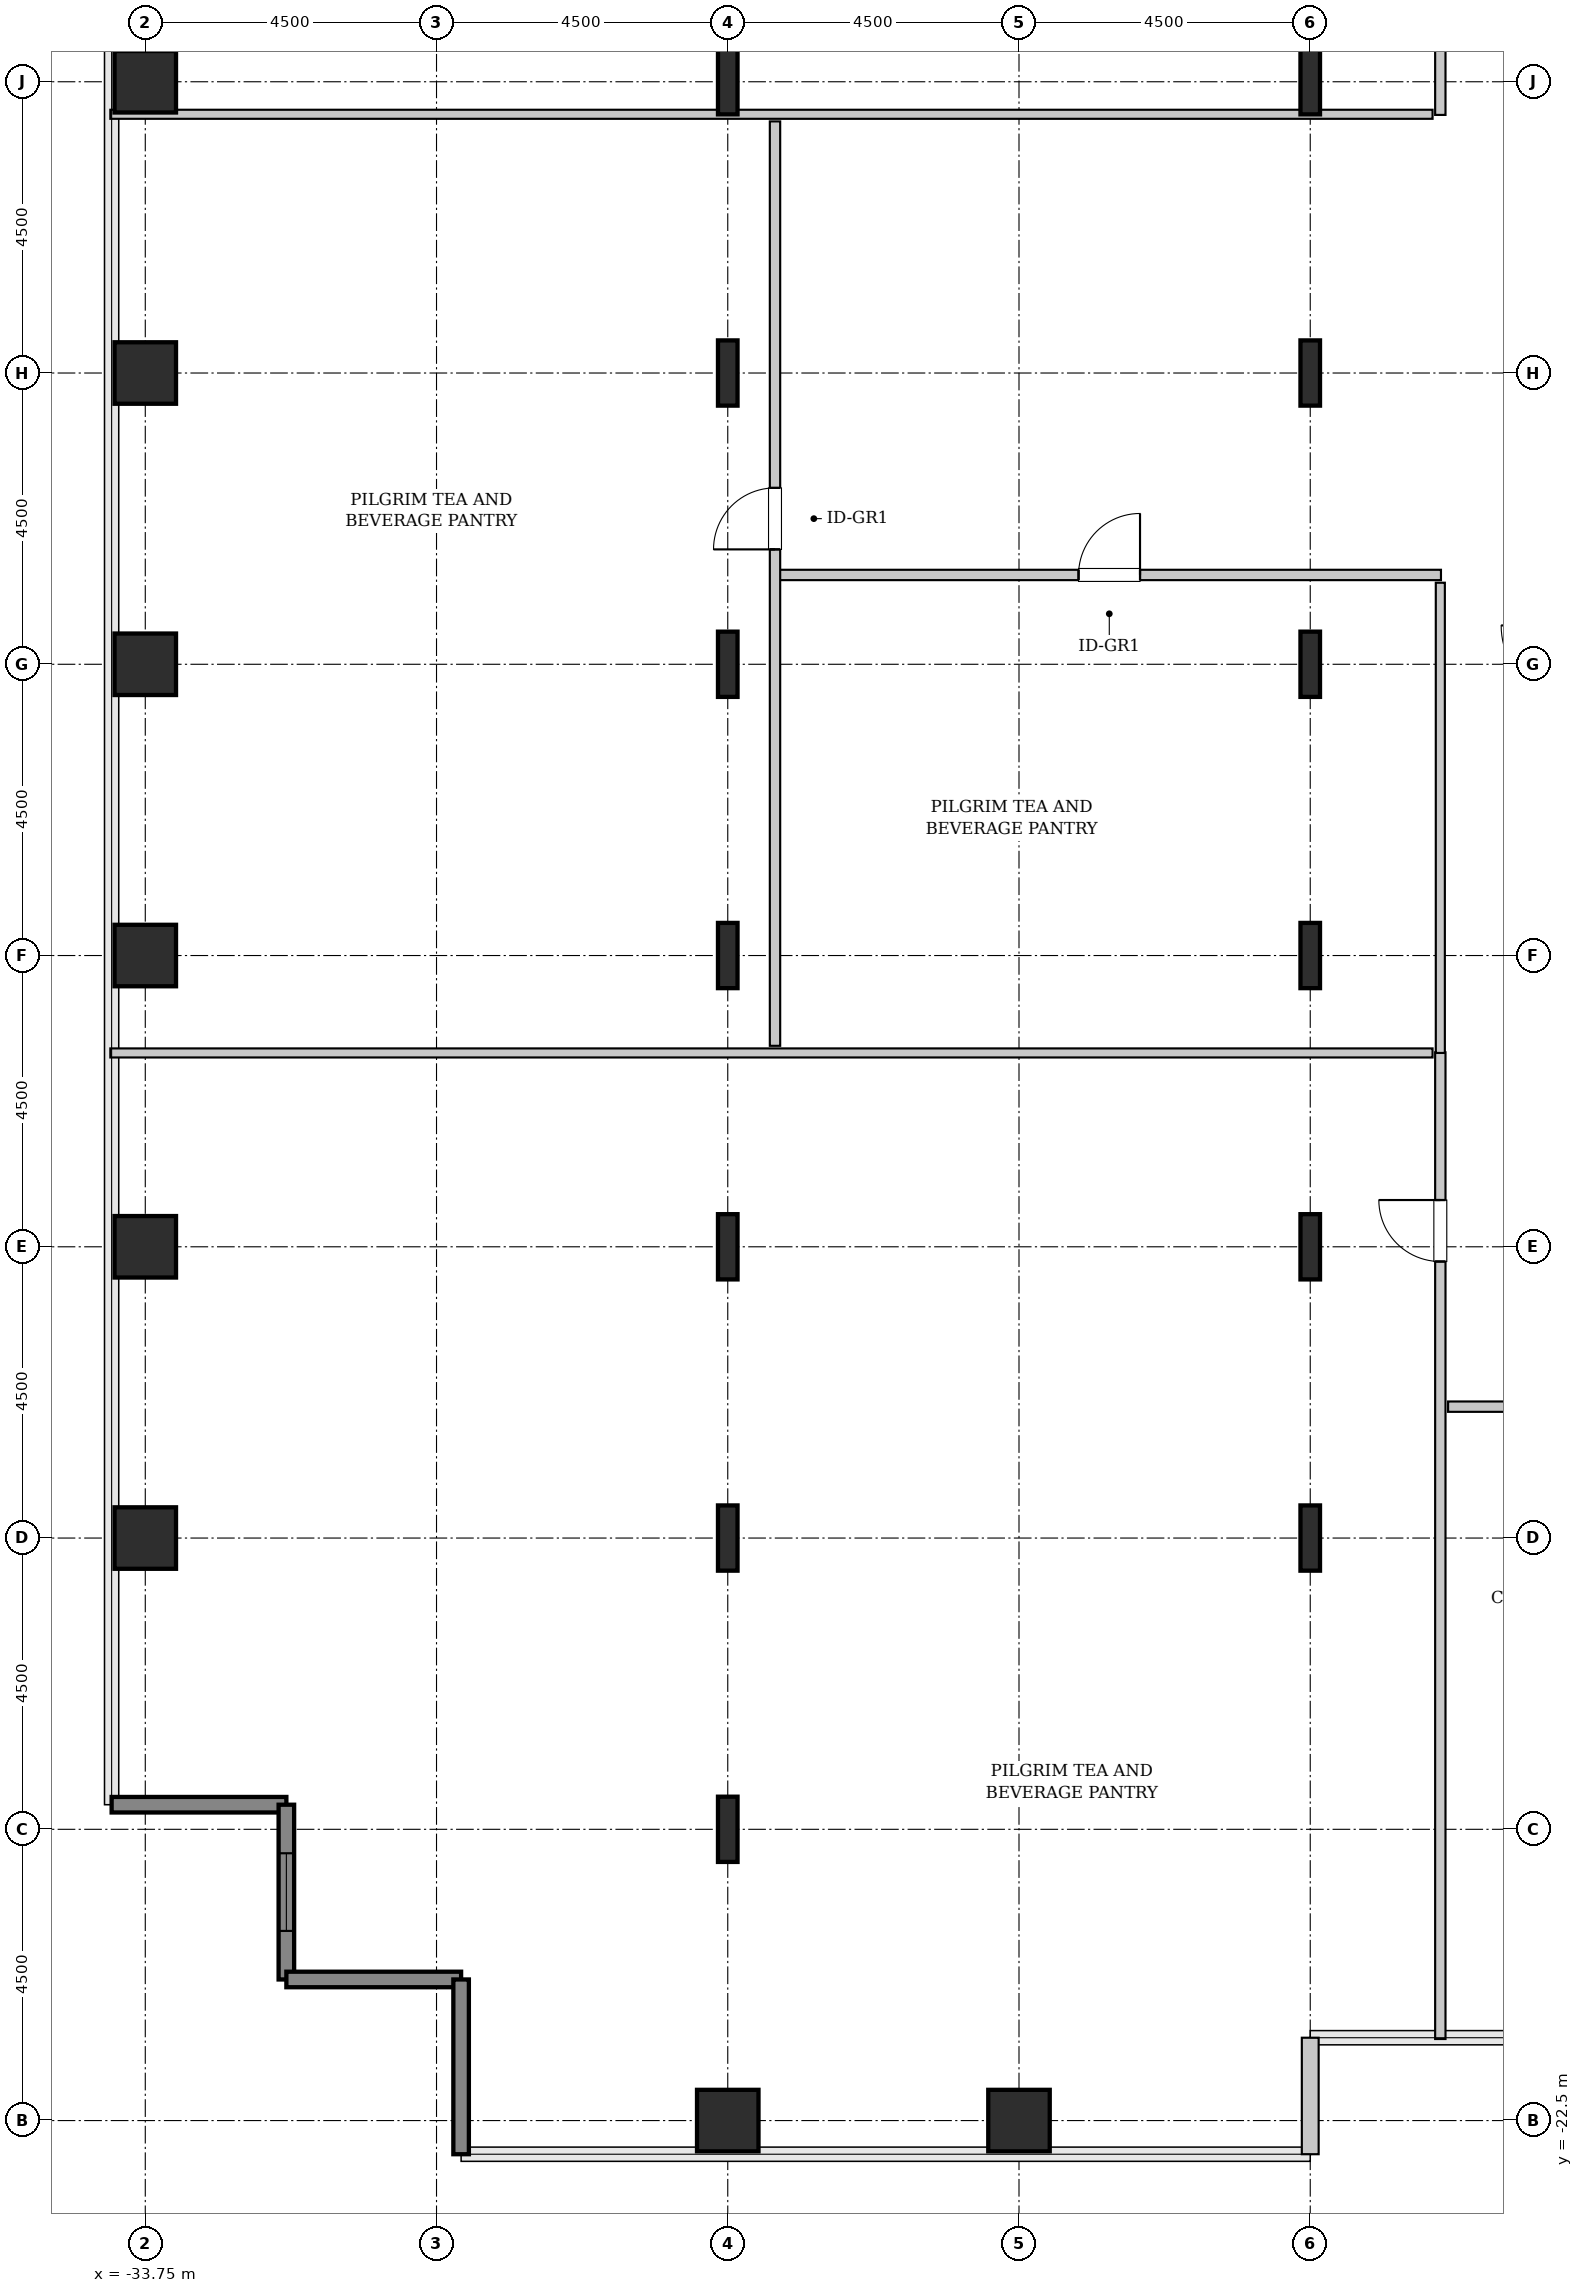
"""IFC4 building model, lengths in metres.
Left out: names, types, materials, properties, quantities, classifications, styles, units other than length and angle.
Written with IfcOpenShell. Run it as: python <this file> out.ifc"""

import sys

from ifc_helpers import new_model, si_unit, direction, frame, frame_2d, origin, origin_2d, place, context, subcontext, project, spatial, rectangle, hollow_rectangle, i_section, extrude, source, transform, mapped, element, fill, save


model = new_model("IFC4")
c1 = context("Model", 3, precision=1e-05, world=origin(), true_north=direction((0.0, 1.0)))
c2 = subcontext(c1, "Body", "Model", "MODEL_VIEW")
j1 = project(units=[si_unit("LENGTHUNIT", "METRE"), si_unit("PLANEANGLEUNIT", "RADIAN")], contexts=[c1])
p1 = place(None, origin())
s1 = spatial("IfcSite", under=j1, at=p1, CompositionType="ELEMENT")
p2 = place(p1, origin())
s2 = spatial("IfcBuilding", under=s1, at=p2, CompositionType="ELEMENT")
p3 = place(p2, frame((0.0, 0.0, 63.4)))
s3 = spatial("IfcBuildingStorey", under=s2, at=p3, CompositionType="ELEMENT", Elevation=63.4)
m1 = source(origin(), c2, "Body", "SweptSolid", [
    extrude(hollow_rectangle(XDim=0.95, YDim=0.95, WallThickness=0.045, InnerFilletRadius=0.045, OuterFilletRadius=0.09, at=origin_2d()), origin(), (0.0, 0.0, 1.0), 3.8),
])
for number, where, z_axis, x_axis in (
    (1, (-33.75, -13.5, 0.0), (0.0, 0.0, 1.0), (1.0, 0.0, 0.0)),
    (2, (-33.75, -9.0, 0.0), (0.0, 0.0, 1.0), (1.0, 0.0, 0.0)),
    (3, (-33.75, -4.5, 0.0), (0.0, 0.0, 1.0), (1.0, 0.0, 0.0)),
    (4, (-33.75, 0.0, 0.0), (0.0, 0.0, 1.0), (1.0, 0.0, 0.0)),
    (5, (-33.75, 4.5, 0.0), (0.0, 0.0, 1.0), (1.0, 0.0, 0.0)),
    (6, (-33.75, 9.0, 0.0), (0.0, 0.0, 1.0), (1.0, 0.0, 0.0)),
    (7, (-24.75, -22.5, 0.0), (0.0, 0.0, 1.0), (1.0, 0.0, 0.0)),
):
    element("IfcColumn", number, at=place(p3, frame(where, z_axis=z_axis, x_axis=x_axis)), inside=s3, PredefinedType="COLUMN", context=c2, shape_type="MappedRepresentation", body=[
        mapped(m1, transform((0.0, 0.0, 0.0), x_axis=(1.0, 0.0, 0.0), y_axis=(0.0, 1.0, 0.0), z_axis=(0.0, 0.0, 1.0), scale=1.0)),
    ])
m2 = source(origin(), c2, "Body", "SweptSolid", [
    extrude(i_section(OverallWidth=0.302, OverallDepth=1.008, WebThickness=0.021, FlangeThickness=0.04, FilletRadius=0.03, at=origin_2d()), origin(), (0.0, 0.0, 1.0), 3.8),
])
for number, where, z_axis, x_axis in (
    (8, (-24.75, -18.0, 0.0), (0.0, 0.0, 1.0), (1.0, 0.0, 0.0)),
    (9, (-24.75, -13.5, 0.0), (0.0, 0.0, 1.0), (1.0, 0.0, 0.0)),
    (10, (-24.75, -9.0, 0.0), (0.0, 0.0, 1.0), (1.0, 0.0, 0.0)),
    (11, (-24.75, -4.5, 0.0), (0.0, 0.0, 1.0), (1.0, 0.0, 0.0)),
    (12, (-24.75, 0.0, 0.0), (0.0, 0.0, 1.0), (1.0, 0.0, 0.0)),
    (13, (-24.75, 4.5, 0.0), (0.0, 0.0, 1.0), (1.0, 0.0, 0.0)),
    (14, (-24.75, 9.0, 0.0), (0.0, 0.0, 1.0), (1.0, 0.0, 0.0)),
):
    element("IfcColumn", number, at=place(p3, frame(where, z_axis=z_axis, x_axis=x_axis)), inside=s3, PredefinedType="COLUMN", context=c2, shape_type="MappedRepresentation", body=[
        mapped(m2, transform((0.0, 0.0, 0.0), x_axis=(1.0, 0.0, 0.0), y_axis=(0.0, 1.0, 0.0), z_axis=(0.0, 0.0, 1.0), scale=1.0)),
    ])
p4 = place(p3, frame((-20.25, -22.5, 0.0), z_axis=(0.0, 0.0, 1.0), x_axis=(1.0, 0.0, 0.0)))
e15 = element("IfcColumn", 15, at=p4, inside=s3, PredefinedType="COLUMN", context=c2, shape_type="MappedRepresentation", body=[
    mapped(m1, transform((0.0, 0.0, 0.0), x_axis=(1.0, 0.0, 0.0), y_axis=(0.0, 1.0, 0.0), z_axis=(0.0, 0.0, 1.0), scale=1.0)),
])
for number, where, z_axis, x_axis in (
    (16, (-15.75, -13.5, 0.0), (0.0, 0.0, 1.0), (1.0, 0.0, 0.0)),
    (17, (-15.75, -9.0, 0.0), (0.0, 0.0, 1.0), (1.0, 0.0, 0.0)),
    (18, (-15.75, -4.5, 0.0), (0.0, 0.0, 1.0), (1.0, 0.0, 0.0)),
    (19, (-15.75, 0.0, 0.0), (0.0, 0.0, 1.0), (1.0, 0.0, 0.0)),
    (20, (-15.75, 4.5, 0.0), (0.0, 0.0, 1.0), (1.0, 0.0, 0.0)),
    (21, (-15.75, 9.0, 0.0), (0.0, 0.0, 1.0), (1.0, 0.0, 0.0)),
):
    element("IfcColumn", number, at=place(p3, frame(where, z_axis=z_axis, x_axis=x_axis)), inside=s3, PredefinedType="COLUMN", context=c2, shape_type="MappedRepresentation", body=[
        mapped(m2, transform((0.0, 0.0, 0.0), x_axis=(1.0, 0.0, 0.0), y_axis=(0.0, 1.0, 0.0), z_axis=(0.0, 0.0, 1.0), scale=1.0)),
    ])
m3 = source(origin(), c2, "Body", "SweptSolid", [
    extrude(rectangle(XDim=2.7, YDim=0.24, at=frame_2d((1.35, 0.0))), origin(), (0.0, 0.0, 1.0), 3.55),
])
p5 = place(p3, frame((-34.27, -17.62, 0.0), z_axis=(0.0, 0.0, 1.0), x_axis=(1.0, 0.0, 0.0)))
e22 = element("IfcWall", 22, at=p5, inside=s3, PredefinedType="SHEAR", context=c2, shape_type="MappedRepresentation", body=[
    mapped(m3, transform((0.0, 0.0, 0.0), x_axis=(1.0, 0.0, 0.0), y_axis=(0.0, 1.0, 0.0), z_axis=(0.0, 0.0, 1.0), scale=1.0)),
])
p6 = place(p3, frame((-31.57, -17.62, 0.0), z_axis=(0.0, 0.0, 1.0), x_axis=(0.0, -1.0, 0.0)))
e23 = element("IfcWall", 23, at=p6, inside=s3, PredefinedType="SHEAR", context=c2, shape_type="MappedRepresentation", body=[
    mapped(m3, transform((0.0, 0.0, 0.0), x_axis=(1.0, 0.0, 0.0), y_axis=(0.0, 1.0, 0.0), z_axis=(0.0, 0.0, 1.0), scale=1.0)),
])
p7 = place(p6, frame((0.75, 0.0, 0.85)))
e24 = element("IfcOpeningElement", 24, at=p7, cuts=e23, PredefinedType="OPENING", context=c2, shape_type="SweptSolid", body=[
    extrude(rectangle(XDim=1.2, YDim=1.8, at=frame_2d((0.6, 0.9))), frame((0.0, 0.13, 0.0), z_axis=(0.0, -1.0, 0.0), x_axis=(1.0, 0.0, 0.0)), (0.0, 0.0, 1.0), 0.26),
])
for number, where, z_axis, x_axis in (
    (25, (-31.57, -20.32, 0.0), (0.0, 0.0, 1.0), (1.0, 0.0, 0.0)),
    (26, (-28.87, -20.32, 0.0), (0.0, 0.0, 1.0), (0.0, -1.0, 0.0)),
):
    element("IfcWall", number, at=place(p3, frame(where, z_axis=z_axis, x_axis=x_axis)), inside=s3, PredefinedType="SHEAR", context=c2, shape_type="MappedRepresentation", body=[
        mapped(m3, transform((0.0, 0.0, 0.0), x_axis=(1.0, 0.0, 0.0), y_axis=(0.0, 1.0, 0.0), z_axis=(0.0, 0.0, 1.0), scale=1.0)),
    ])
m4 = source(origin(), c2, "Body", "SweptSolid", [
    extrude(rectangle(XDim=1.8, YDim=0.26, at=frame_2d((0.9, 0.0))), origin(), (0.0, 0.0, 1.0), 3.55),
])
p8 = place(p3, frame((-15.75, -23.02, 0.0), z_axis=(0.0, 0.0, 1.0), x_axis=(0.0, 1.0, 0.0)))
e27 = element("IfcWall", 27, at=p8, inside=s3, PredefinedType="SOLIDWALL", context=c2, shape_type="MappedRepresentation", body=[
    mapped(m4, transform((0.0, 0.0, 0.0), x_axis=(1.0, 0.0, 0.0), y_axis=(0.0, 1.0, 0.0), z_axis=(0.0, 0.0, 1.0), scale=1.0)),
])
m5 = source(origin(), c2, "Body", "SweptSolid", [
    extrude(rectangle(XDim=15.245, YDim=0.16, at=frame_2d((7.623, 0.0))), origin(), (0.0, 0.0, 1.0), 3.535),
])
p9 = place(p3, frame((-13.74, -21.24, 0.0), z_axis=(0.0, 0.0, 1.0), x_axis=(0.0, 1.0, 0.0)))
e28 = element("IfcWall", 28, at=p9, inside=s3, PredefinedType="PARTITIONING", context=c2, shape_type="MappedRepresentation", body=[
    mapped(m5, transform((0.0, 0.0, 0.0), x_axis=(1.0, 0.0, 0.0), y_axis=(0.0, 1.0, 0.0), z_axis=(0.0, 0.0, 1.0), scale=1.0)),
])
p10 = place(p9, frame((12.012, 0.0, 0.0)))
e29 = element("IfcOpeningElement", 29, at=p10, cuts=e28, PredefinedType="OPENING", context=c2, shape_type="SweptSolid", body=[
    extrude(rectangle(XDim=0.95, YDim=2.1, at=frame_2d((0.475, 1.05))), frame((0.0, 0.09, 0.0), z_axis=(0.0, -1.0, 0.0), x_axis=(1.0, 0.0, 0.0)), (0.0, 0.0, 1.0), 0.18),
])
m6 = source(origin(), c2, "Body", "SweptSolid", [
    extrude(rectangle(XDim=20.43, YDim=0.14, at=frame_2d((10.215, 0.0))), origin(), (0.0, 0.0, 1.0), 3.535),
])
p11 = place(p3, frame((-34.29, -6.005, 0.0), z_axis=(0.0, 0.0, 1.0), x_axis=(1.0, 0.0, 0.0)))
e30 = element("IfcWall", 30, at=p11, inside=s3, PredefinedType="PARTITIONING", context=c2, shape_type="MappedRepresentation", body=[
    mapped(m6, transform((0.0, 0.0, 0.0), x_axis=(1.0, 0.0, 0.0), y_axis=(0.0, 1.0, 0.0), z_axis=(0.0, 0.0, 1.0), scale=1.0)),
])
m7 = source(origin(), c2, "Body", "SweptSolid", [
    extrude(rectangle(XDim=12.752, YDim=0.16, at=frame_2d((6.376, 0.0))), origin(), (0.0, 0.0, 1.0), 3.535),
])
p12 = place(p3, frame((-13.74, 8.488, 0.0), z_axis=(0.0, 0.0, 1.0), x_axis=(0.0, 1.0, 0.0)))
e31 = element("IfcWall", 31, at=p12, inside=s3, PredefinedType="PARTITIONING", context=c2, shape_type="MappedRepresentation", body=[
    mapped(m7, transform((0.0, 0.0, 0.0), x_axis=(1.0, 0.0, 0.0), y_axis=(0.0, 1.0, 0.0), z_axis=(0.0, 0.0, 1.0), scale=1.0)),
])
p13 = place(p12, frame((1.036, 0.0, 0.0)))
e32 = element("IfcOpeningElement", 32, at=p13, cuts=e31, PredefinedType="OPENING", context=c2, shape_type="SweptSolid", body=[
    extrude(rectangle(XDim=0.95, YDim=2.1, at=frame_2d((0.475, 1.05))), frame((0.0, 0.09, 0.0), z_axis=(0.0, -1.0, 0.0), x_axis=(1.0, 0.0, 0.0)), (0.0, 0.0, 1.0), 0.18),
])
m8 = source(origin(), c2, "Body", "SweptSolid", [
    extrude(rectangle(XDim=20.43, YDim=0.14, at=frame_2d((10.215, 0.0))), origin(), (0.0, 0.0, 1.0), 2.825),
])
p14 = place(p3, frame((-34.29, 8.498, 0.0), z_axis=(0.0, 0.0, 1.0), x_axis=(1.0, 0.0, 0.0)))
e33 = element("IfcWall", 33, at=p14, inside=s3, PredefinedType="PARTITIONING", context=c2, shape_type="MappedRepresentation", body=[
    mapped(m8, transform((0.0, 0.0, 0.0), x_axis=(1.0, 0.0, 0.0), y_axis=(0.0, 1.0, 0.0), z_axis=(0.0, 0.0, 1.0), scale=1.0)),
])
m9 = source(origin(), c2, "Body", "SweptSolid", [
    extrude(rectangle(XDim=10.25, YDim=0.16, at=frame_2d((5.125, 0.0))), origin(), (0.0, 0.0, 1.0), 3.535),
])
p15 = place(p3, frame((-23.98, 1.38, 0.0), z_axis=(0.0, 0.0, 1.0), x_axis=(1.0, 0.0, 0.0)))
e34 = element("IfcWall", 34, at=p15, inside=s3, PredefinedType="PARTITIONING", context=c2, shape_type="MappedRepresentation", body=[
    mapped(m9, transform((0.0, 0.0, 0.0), x_axis=(1.0, 0.0, 0.0), y_axis=(0.0, 1.0, 0.0), z_axis=(0.0, 0.0, 1.0), scale=1.0)),
])
p16 = place(p15, frame((4.65, 0.0, 0.0)))
e35 = element("IfcOpeningElement", 35, at=p16, cuts=e34, PredefinedType="OPENING", context=c2, shape_type="SweptSolid", body=[
    extrude(rectangle(XDim=0.95, YDim=2.1, at=frame_2d((0.475, 1.05))), frame((0.0, 0.09, 0.0), z_axis=(0.0, -1.0, 0.0), x_axis=(1.0, 0.0, 0.0)), (0.0, 0.0, 1.0), 0.18),
])
m10 = source(origin(), c2, "Body", "SweptSolid", [
    extrude(rectangle(XDim=7.265, YDim=0.14, at=frame_2d((3.632, 0.0))), origin(), (0.0, 0.0, 1.0), 3.535),
])
p17 = place(p3, frame((-13.74, -6.005, 0.0), z_axis=(0.0, 0.0, 1.0), x_axis=(0.0, 1.0, 0.0)))
e36 = element("IfcWall", 36, at=p17, inside=s3, PredefinedType="PARTITIONING", context=c2, shape_type="MappedRepresentation", body=[
    mapped(m10, transform((0.0, 0.0, 0.0), x_axis=(1.0, 0.0, 0.0), y_axis=(0.0, 1.0, 0.0), z_axis=(0.0, 0.0, 1.0), scale=1.0)),
])
m11 = source(origin(), c2, "Body", "SweptSolid", [
    extrude(rectangle(XDim=14.282, YDim=0.16, at=frame_2d((7.141, 0.0))), origin(), (0.0, 0.0, 1.0), 3.535),
])
p18 = place(p3, frame((-24.02, -5.895, 0.0), z_axis=(0.0, 0.0, 1.0), x_axis=(0.0, 1.0, 0.0)))
e37 = element("IfcWall", 37, at=p18, inside=s3, PredefinedType="PARTITIONING", context=c2, shape_type="MappedRepresentation", body=[
    mapped(m11, transform((0.0, 0.0, 0.0), x_axis=(1.0, 0.0, 0.0), y_axis=(0.0, 1.0, 0.0), z_axis=(0.0, 0.0, 1.0), scale=1.0)),
])
p19 = place(p18, frame((7.67, 0.0, 0.0)))
e38 = element("IfcOpeningElement", 38, at=p19, cuts=e37, PredefinedType="OPENING", context=c2, shape_type="SweptSolid", body=[
    extrude(rectangle(XDim=0.95, YDim=2.1, at=frame_2d((0.475, 1.05))), frame((0.0, 0.09, 0.0), z_axis=(0.0, -1.0, 0.0), x_axis=(1.0, 0.0, 0.0)), (0.0, 0.0, 1.0), 0.18),
])
m12 = source(origin(), c2, "Body", "SweptSolid", [
    extrude(rectangle(XDim=3.825, YDim=0.16, at=frame_2d((1.913, 0.0))), origin(), (0.0, 0.0, 1.0), 3.535),
])
p20 = place(p3, frame((-13.62, -11.47, 0.0), z_axis=(0.0, 0.0, 1.0), x_axis=(1.0, 0.0, 0.0)))
e39 = element("IfcWall", 39, at=p20, inside=s3, PredefinedType="PARTITIONING", context=c2, shape_type="MappedRepresentation", body=[
    mapped(m12, transform((0.0, 0.0, 0.0), x_axis=(1.0, 0.0, 0.0), y_axis=(0.0, 1.0, 0.0), z_axis=(0.0, 0.0, 1.0), scale=1.0)),
])
p21 = place(p20, frame((1.438, 0.0, 0.0)))
e40 = element("IfcOpeningElement", 40, at=p21, cuts=e39, PredefinedType="OPENING", context=c2, shape_type="SweptSolid", body=[
    extrude(rectangle(XDim=0.95, YDim=2.1, at=frame_2d((0.475, 1.05))), frame((0.0, 0.09, 0.0), z_axis=(0.0, -1.0, 0.0), x_axis=(1.0, 0.0, 0.0)), (0.0, 0.0, 1.0), 0.18),
])
m13 = source(origin(), c2, "Body", "SweptSolid", [
    extrude(rectangle(XDim=1.2, YDim=1.8, at=frame_2d((0.6, 0.9))), frame((0.0, 0.03, 0.0), z_axis=(0.0, -1.0, 0.0), x_axis=(1.0, 0.0, 0.0)), (0.0, 0.0, 1.0), 0.06),
])
p22 = place(p7, origin())
e41 = element("IfcWindow", 41, at=p22, inside=s3, PartitioningType="SINGLE_PANEL", PredefinedType="WINDOW", context=c2, shape_type="MappedRepresentation", body=[
    mapped(m13, transform((0.0, 0.0, 0.0), x_axis=(1.0, 0.0, 0.0), y_axis=(0.0, 1.0, 0.0), z_axis=(0.0, 0.0, 1.0), scale=1.0)),
])
fill(e24, e41)
m14 = source(origin(), c2, "Body", "SweptSolid", [
    extrude(rectangle(XDim=0.95, YDim=2.1, at=frame_2d((0.475, 1.05))), frame((0.0, 0.025, 0.0), z_axis=(0.0, -1.0, 0.0), x_axis=(1.0, 0.0, 0.0)), (0.0, 0.0, 1.0), 0.05),
])
p23 = place(p10, origin())
e42 = element("IfcDoor", 42, at=p23, inside=s3, OperationType="SINGLE_SWING_RIGHT", PredefinedType="DOOR", context=c2, shape_type="MappedRepresentation", body=[
    mapped(m14, transform((0.0, 0.0, 0.0), x_axis=(1.0, 0.0, 0.0), y_axis=(0.0, 1.0, 0.0), z_axis=(0.0, 0.0, 1.0), scale=1.0)),
])
fill(e29, e42)
p24 = place(p16, origin())
e43 = element("IfcDoor", 43, at=p24, inside=s3, OperationType="SINGLE_SWING_RIGHT", PredefinedType="DOOR", context=c2, shape_type="MappedRepresentation", body=[
    mapped(m14, transform((0.0, 0.0, 0.0), x_axis=(1.0, 0.0, 0.0), y_axis=(0.0, 1.0, 0.0), z_axis=(0.0, 0.0, 1.0), scale=1.0)),
])
fill(e35, e43)
p25 = place(p19, origin())
e44 = element("IfcDoor", 44, at=p25, inside=s3, OperationType="SINGLE_SWING_LEFT", PredefinedType="DOOR", context=c2, shape_type="MappedRepresentation", body=[
    mapped(m14, transform((0.0, 0.0, 0.0), x_axis=(1.0, 0.0, 0.0), y_axis=(0.0, 1.0, 0.0), z_axis=(0.0, 0.0, 1.0), scale=1.0)),
])
fill(e38, e44)
save(model, sys.argv[1])
